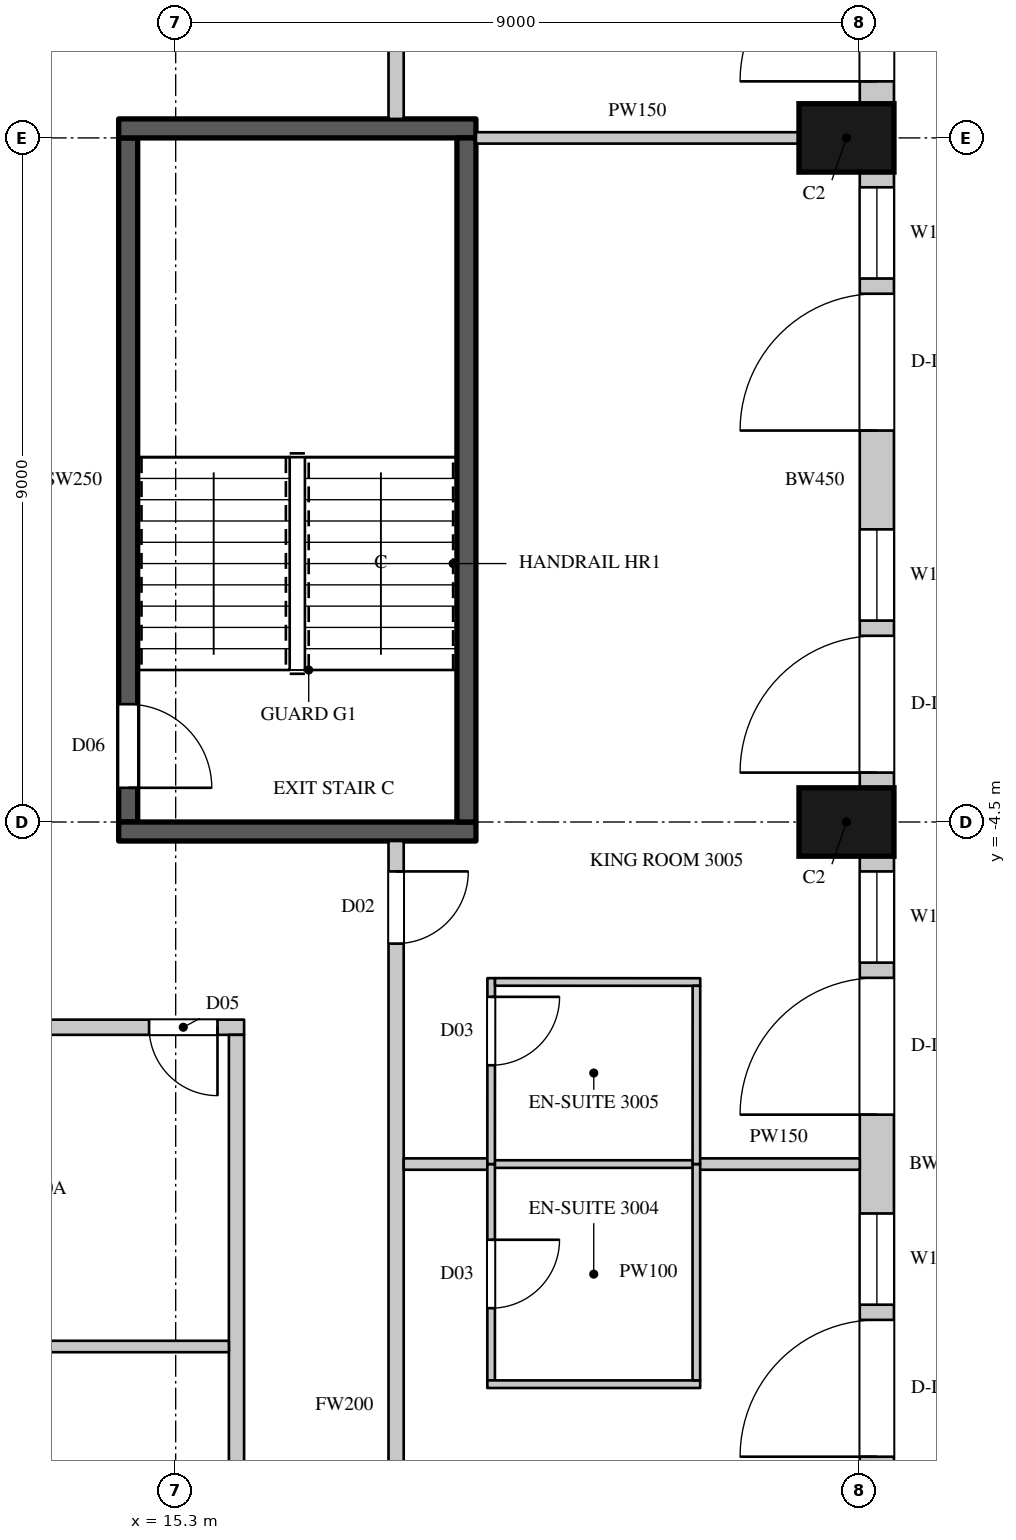
"""IFC4 building model, lengths in metres.
Left out: names, types, materials, properties, quantities, classifications, styles, units other than length and angle.
Written with IfcOpenShell. Run it as: python <this file> out.ifc"""

import sys

from ifc_helpers import new_model, si_unit, direction, frame, frame_2d, origin, origin_2d, place, context, subcontext, project, spatial, rectangle, extrude, element, fill, save


model = new_model("IFC4")
c1 = context("Model", 3, precision=1e-05, world=origin(), true_north=direction((0.0, 1.0)))
c2 = subcontext(c1, "Body", "Model", "MODEL_VIEW")
j1 = project(units=[si_unit("LENGTHUNIT", "METRE"), si_unit("PLANEANGLEUNIT", "RADIAN")], contexts=[c1])
p1 = place(None, origin())
s1 = spatial("IfcSite", under=j1, at=p1, CompositionType="ELEMENT")
p2 = place(p1, origin())
s2 = spatial("IfcBuilding", under=s1, at=p2, CompositionType="ELEMENT")
p3 = place(p2, frame((0.0, 0.0, 138.3)))
s3 = spatial("IfcBuildingStorey", under=s2, at=p3, CompositionType="ELEMENT", Elevation=138.3)
for number, where, z_axis, x_axis in (
    (1, (24.125, -4.5, 0.0), (0.0, 0.0, 1.0), (0.0, 1.0, 0.0)),
    (2, (24.125, 4.5, 0.0), (0.0, 0.0, 1.0), (0.0, 1.0, 0.0)),
):
    element("IfcColumn", number, at=place(p3, frame(where, z_axis=z_axis, x_axis=x_axis)), inside=s3, PredefinedType="COLUMN", context=c2, shape_type="SweptSolid", body=[
        extrude(rectangle(XDim=0.9, YDim=1.25, at=origin_2d()), origin(), (0.0, 0.0, 1.0), 3.6),
    ])
p4 = place(p3, frame((24.525, -13.05, 0.0), z_axis=(0.0, 0.0, 1.0), x_axis=(0.0, 1.0, 0.0)))
e3 = element("IfcWall", 3, at=p4, inside=s3, PredefinedType="SOLIDWALL", context=c2, shape_type="SweptSolid", body=[
    extrude(rectangle(XDim=8.1, YDim=0.45, at=frame_2d((4.05, 0.0))), origin(), (0.0, 0.0, 1.0), 3.3),
])
p5 = place(p4, frame((0.2, 0.0, 0.0)))
e4 = element("IfcOpeningElement", 4, at=p5, cuts=e3, PredefinedType="OPENING", context=c2, shape_type="SweptSolid", body=[
    extrude(rectangle(XDim=1.8, YDim=2.4, at=frame_2d((0.9, 1.2))), frame((0.0, 0.235, 0.0), z_axis=(0.0, -1.0, 0.0), x_axis=(1.0, 0.0, 0.0)), (0.0, 0.0, 1.0), 0.47),
])
p6 = place(p4, frame((2.2, 0.0, 1.05)))
e5 = element("IfcOpeningElement", 5, at=p6, cuts=e3, PredefinedType="OPENING", context=c2, shape_type="SweptSolid", body=[
    extrude(rectangle(XDim=1.2, YDim=2.0, at=frame_2d((0.6, 1.0))), frame((0.0, 0.235, 0.0), z_axis=(0.0, -1.0, 0.0), x_axis=(1.0, 0.0, 0.0)), (0.0, 0.0, 1.0), 0.47),
])
p7 = place(p4, frame((4.7, 0.0, 0.0)))
e6 = element("IfcOpeningElement", 6, at=p7, cuts=e3, PredefinedType="OPENING", context=c2, shape_type="SweptSolid", body=[
    extrude(rectangle(XDim=1.8, YDim=2.4, at=frame_2d((0.9, 1.2))), frame((0.0, 0.235, 0.0), z_axis=(0.0, -1.0, 0.0), x_axis=(1.0, 0.0, 0.0)), (0.0, 0.0, 1.0), 0.47),
])
p8 = place(p4, frame((6.7, 0.0, 1.05)))
e7 = element("IfcOpeningElement", 7, at=p8, cuts=e3, PredefinedType="OPENING", context=c2, shape_type="SweptSolid", body=[
    extrude(rectangle(XDim=1.2, YDim=2.0, at=frame_2d((0.6, 1.0))), frame((0.0, 0.235, 0.0), z_axis=(0.0, -1.0, 0.0), x_axis=(1.0, 0.0, 0.0)), (0.0, 0.0, 1.0), 0.47),
])
p9 = place(p3, frame((24.525, -4.05, 0.0), z_axis=(0.0, 0.0, 1.0), x_axis=(0.0, 1.0, 0.0)))
e8 = element("IfcWall", 8, at=p9, inside=s3, PredefinedType="SOLIDWALL", context=c2, shape_type="SweptSolid", body=[
    extrude(rectangle(XDim=8.1, YDim=0.45, at=frame_2d((4.05, 0.0))), origin(), (0.0, 0.0, 1.0), 3.3),
])
p10 = place(p9, frame((0.2, 0.0, 0.0)))
e9 = element("IfcOpeningElement", 9, at=p10, cuts=e8, PredefinedType="OPENING", context=c2, shape_type="SweptSolid", body=[
    extrude(rectangle(XDim=1.8, YDim=2.4, at=frame_2d((0.9, 1.2))), frame((0.0, 0.235, 0.0), z_axis=(0.0, -1.0, 0.0), x_axis=(1.0, 0.0, 0.0)), (0.0, 0.0, 1.0), 0.47),
])
p11 = place(p9, frame((2.2, 0.0, 1.05)))
e10 = element("IfcOpeningElement", 10, at=p11, cuts=e8, PredefinedType="OPENING", context=c2, shape_type="SweptSolid", body=[
    extrude(rectangle(XDim=1.2, YDim=2.0, at=frame_2d((0.6, 1.0))), frame((0.0, 0.235, 0.0), z_axis=(0.0, -1.0, 0.0), x_axis=(1.0, 0.0, 0.0)), (0.0, 0.0, 1.0), 0.47),
])
p12 = place(p9, frame((4.7, 0.0, 0.0)))
e11 = element("IfcOpeningElement", 11, at=p12, cuts=e8, PredefinedType="OPENING", context=c2, shape_type="SweptSolid", body=[
    extrude(rectangle(XDim=1.8, YDim=2.4, at=frame_2d((0.9, 1.2))), frame((0.0, 0.235, 0.0), z_axis=(0.0, -1.0, 0.0), x_axis=(1.0, 0.0, 0.0)), (0.0, 0.0, 1.0), 0.47),
])
p13 = place(p9, frame((6.7, 0.0, 1.05)))
e12 = element("IfcOpeningElement", 12, at=p13, cuts=e8, PredefinedType="OPENING", context=c2, shape_type="SweptSolid", body=[
    extrude(rectangle(XDim=1.2, YDim=2.0, at=frame_2d((0.6, 1.0))), frame((0.0, 0.235, 0.0), z_axis=(0.0, -1.0, 0.0), x_axis=(1.0, 0.0, 0.0)), (0.0, 0.0, 1.0), 0.47),
])
p14 = place(p3, frame((24.525, 4.95, 0.0), z_axis=(0.0, 0.0, 1.0), x_axis=(0.0, 1.0, 0.0)))
e13 = element("IfcWall", 13, at=p14, inside=s3, PredefinedType="SOLIDWALL", context=c2, shape_type="SweptSolid", body=[
    extrude(rectangle(XDim=8.439, YDim=0.45, at=frame_2d((4.219, 0.0))), origin(), (0.0, 0.0, 1.0), 3.3),
])
p15 = place(p14, frame((0.294, 0.0, 0.0)))
e14 = element("IfcOpeningElement", 14, at=p15, cuts=e13, PredefinedType="OPENING", context=c2, shape_type="SweptSolid", body=[
    extrude(rectangle(XDim=1.8, YDim=2.4, at=frame_2d((0.9, 1.2))), frame((0.0, 0.235, 0.0), z_axis=(0.0, -1.0, 0.0), x_axis=(1.0, 0.0, 0.0)), (0.0, 0.0, 1.0), 0.47),
])
p16 = place(p14, frame((2.294, 0.0, 1.05)))
e15 = element("IfcOpeningElement", 15, at=p16, cuts=e13, PredefinedType="OPENING", context=c2, shape_type="SweptSolid", body=[
    extrude(rectangle(XDim=1.2, YDim=2.0, at=frame_2d((0.6, 1.0))), frame((0.0, 0.235, 0.0), z_axis=(0.0, -1.0, 0.0), x_axis=(1.0, 0.0, 0.0)), (0.0, 0.0, 1.0), 0.47),
])
p17 = place(p14, frame((5.232, 0.0, 1.05)))
e16 = element("IfcOpeningElement", 16, at=p17, cuts=e13, PredefinedType="OPENING", context=c2, shape_type="SweptSolid", body=[
    extrude(rectangle(XDim=2.7, YDim=2.0, at=frame_2d((1.35, 1.0))), frame((0.0, 0.235, 0.0), z_axis=(0.0, -1.0, 0.0), x_axis=(1.0, 0.0, 0.0)), (0.0, 0.0, 1.0), 0.47),
])
p18 = place(p3, frame((10.5, -7.2, 0.0), z_axis=(0.0, 0.0, 1.0), x_axis=(1.0, 0.0, 0.0)))
e17 = element("IfcWall", 17, at=p18, inside=s3, PredefinedType="PARTITIONING", context=c2, shape_type="SweptSolid", body=[
    extrude(rectangle(XDim=5.7, YDim=0.2, at=frame_2d((2.85, 0.0))), origin(), (0.0, 0.0, 1.0), 3.3),
])
p19 = place(p18, frame((4.45, 0.0, 0.0)))
e18 = element("IfcOpeningElement", 18, at=p19, cuts=e17, PredefinedType="OPENING", context=c2, shape_type="SweptSolid", body=[
    extrude(rectangle(XDim=0.9, YDim=2.2, at=frame_2d((0.45, 1.1))), frame((0.0, 0.11, 0.0), z_axis=(0.0, -1.0, 0.0), x_axis=(1.0, 0.0, 0.0)), (0.0, 0.0, 1.0), 0.22),
])
p20 = place(p3, frame((16.1, -17.4, 0.0), z_axis=(0.0, 0.0, 1.0), x_axis=(0.0, 1.0, 0.0)))
e19 = element("IfcWall", 19, at=p20, inside=s3, PredefinedType="PARTITIONING", context=c2, shape_type="SweptSolid", body=[
    extrude(rectangle(XDim=10.1, YDim=0.2, at=frame_2d((5.05, 0.0))), origin(), (0.0, 0.0, 1.0), 3.3),
])
p21 = place(p3, frame((18.2, -19.6, 0.0), z_axis=(0.0, 0.0, 1.0), x_axis=(0.0, 1.0, 0.0)))
e20 = element("IfcWall", 20, at=p21, inside=s3, PredefinedType="PARTITIONING", context=c2, shape_type="SweptSolid", body=[
    extrude(rectangle(XDim=14.85, YDim=0.2, at=frame_2d((7.425, 0.0))), origin(), (0.0, 0.0, 1.0), 3.3),
])
p22 = place(p21, frame((3.9, 0.0, 0.0)))
e21 = element("IfcOpeningElement", 21, at=p22, cuts=e20, PredefinedType="OPENING", context=c2, shape_type="SweptSolid", body=[
    extrude(rectangle(XDim=0.95, YDim=2.2, at=frame_2d((0.475, 1.1))), frame((0.0, 0.11, 0.0), z_axis=(0.0, -1.0, 0.0), x_axis=(1.0, 0.0, 0.0)), (0.0, 0.0, 1.0), 0.22),
])
p23 = place(p21, frame((13.5, 0.0, 0.0)))
e22 = element("IfcOpeningElement", 22, at=p23, cuts=e20, PredefinedType="OPENING", context=c2, shape_type="SweptSolid", body=[
    extrude(rectangle(XDim=0.95, YDim=2.2, at=frame_2d((0.475, 1.1))), frame((0.0, 0.11, 0.0), z_axis=(0.0, -1.0, 0.0), x_axis=(1.0, 0.0, 0.0)), (0.0, 0.0, 1.0), 0.22),
])
p24 = place(p3, frame((18.2, 4.75, 0.0), z_axis=(0.0, 0.0, 1.0), x_axis=(0.0, 1.0, 0.0)))
e23 = element("IfcWall", 23, at=p24, inside=s3, PredefinedType="PARTITIONING", context=c2, shape_type="SweptSolid", body=[
    extrude(rectangle(XDim=14.164, YDim=0.2, at=frame_2d((7.082, 0.0))), origin(), (0.0, 0.0, 1.0), 3.3),
])
p25 = place(p24, frame((1.7, 0.0, 0.0)))
e24 = element("IfcOpeningElement", 24, at=p25, cuts=e23, PredefinedType="OPENING", context=c2, shape_type="SweptSolid", body=[
    extrude(rectangle(XDim=0.9, YDim=2.2, at=frame_2d((0.45, 1.1))), frame((0.0, 0.11, 0.0), z_axis=(0.0, -1.0, 0.0), x_axis=(1.0, 0.0, 0.0)), (0.0, 0.0, 1.0), 0.22),
])
p26 = place(p3, frame((10.4, -11.4, 0.0), z_axis=(0.0, 0.0, 1.0), x_axis=(1.0, 0.0, 0.0)))
e25 = element("IfcWall", 25, at=p26, inside=s3, PredefinedType="PARTITIONING", context=c2, shape_type="SweptSolid", body=[
    extrude(rectangle(XDim=5.6, YDim=0.15, at=frame_2d((2.8, 0.0))), origin(), (0.0, 0.0, 1.0), 3.3),
])
p27 = place(p3, frame((18.3, -9.0, 0.0), z_axis=(0.0, 0.0, 1.0), x_axis=(1.0, 0.0, 0.0)))
e26 = element("IfcWall", 26, at=p27, inside=s3, PredefinedType="PARTITIONING", context=c2, shape_type="SweptSolid", body=[
    extrude(rectangle(XDim=1.13, YDim=0.15, at=frame_2d((0.565, 0.0))), origin(), (0.0, 0.0, 1.0), 2.65),
])
p28 = place(p3, frame((19.25, 4.5, 0.0), z_axis=(0.0, 0.0, 1.0), x_axis=(1.0, 0.0, 0.0)))
e27 = element("IfcWall", 27, at=p28, inside=s3, PredefinedType="PARTITIONING", context=c2, shape_type="SweptSolid", body=[
    extrude(rectangle(XDim=4.25, YDim=0.15, at=frame_2d((2.125, 0.0))), origin(), (0.0, 0.0, 1.0), 3.3),
])
p29 = place(p3, frame((22.17, -9.0, 0.0), z_axis=(0.0, 0.0, 1.0), x_axis=(1.0, 0.0, 0.0)))
e28 = element("IfcWall", 28, at=p29, inside=s3, PredefinedType="PARTITIONING", context=c2, shape_type="SweptSolid", body=[
    extrude(rectangle(XDim=2.13, YDim=0.15, at=frame_2d((1.065, 0.0))), origin(), (0.0, 0.0, 1.0), 2.65),
])
p30 = place(p3, frame((14.675, -4.5, 0.0), z_axis=(0.0, 0.0, 1.0), x_axis=(0.0, 1.0, 0.0)))
e29 = element("IfcWall", 29, at=p30, inside=s3, PredefinedType="SHEAR", context=c2, shape_type="SweptSolid", body=[
    extrude(rectangle(XDim=9.0, YDim=0.25, at=frame_2d((4.5, 0.0))), origin(), (0.0, 0.0, 1.0), 3.3),
])
p31 = place(p30, frame((0.45, 0.0, 0.0)))
e30 = element("IfcOpeningElement", 30, at=p31, cuts=e29, PredefinedType="OPENING", context=c2, shape_type="SweptSolid", body=[
    extrude(rectangle(XDim=1.1, YDim=2.2, at=frame_2d((0.55, 1.1))), frame((0.0, 0.135, 0.0), z_axis=(0.0, -1.0, 0.0), x_axis=(1.0, 0.0, 0.0)), (0.0, 0.0, 1.0), 0.27),
])
for number, where, z_axis, x_axis in (
    (31, (14.55, -4.625, 0.0), (0.0, 0.0, 1.0), (1.0, 0.0, 0.0)),
    (32, (14.55, 4.625, 0.0), (0.0, 0.0, 1.0), (1.0, 0.0, 0.0)),
):
    element("IfcWall", number, at=place(p3, frame(where, z_axis=z_axis, x_axis=x_axis)), inside=s3, PredefinedType="SHEAR", context=c2, shape_type="SweptSolid", body=[
        extrude(rectangle(XDim=4.7, YDim=0.25, at=frame_2d((2.35, 0.0))), origin(), (0.0, 0.0, 1.0), 3.3),
    ])
p32 = place(p3, frame((19.125, -4.5, 0.0), z_axis=(0.0, 0.0, 1.0), x_axis=(0.0, 1.0, 0.0)))
e33 = element("IfcWall", 33, at=p32, inside=s3, PredefinedType="SHEAR", context=c2, shape_type="SweptSolid", body=[
    extrude(rectangle(XDim=9.0, YDim=0.25, at=frame_2d((4.5, 0.0))), origin(), (0.0, 0.0, 1.0), 3.3),
])
p33 = place(p3, frame((19.43, -9.0, 0.0), z_axis=(0.0, 0.0, 1.0), x_axis=(1.0, 0.0, 0.0)))
e34 = element("IfcWall", 34, at=p33, inside=s3, PredefinedType="PARTITIONING", context=c2, shape_type="SweptSolid", body=[
    extrude(rectangle(XDim=2.74, YDim=0.1, at=frame_2d((1.37, 0.0))), origin(), (0.0, 0.0, 1.0), 2.65),
])
p34 = place(p3, frame((19.45, -11.846, 0.0), z_axis=(0.0, 0.0, 1.0), x_axis=(0.0, 1.0, 0.0)))
e35 = element("IfcWall", 35, at=p34, inside=s3, PredefinedType="PARTITIONING", context=c2, shape_type="SweptSolid", body=[
    extrude(rectangle(XDim=2.846, YDim=0.1, at=frame_2d((1.423, 0.0))), origin(), (0.0, 0.0, 1.0), 3.3),
])
p35 = place(p34, frame((0.95, 0.0, 0.0)))
e36 = element("IfcOpeningElement", 36, at=p35, cuts=e35, PredefinedType="OPENING", context=c2, shape_type="SweptSolid", body=[
    extrude(rectangle(XDim=0.9, YDim=2.2, at=frame_2d((0.45, 1.1))), frame((0.0, 0.06, 0.0), z_axis=(0.0, -1.0, 0.0), x_axis=(1.0, 0.0, 0.0)), (0.0, 0.0, 1.0), 0.12),
])
p36 = place(p3, frame((19.4, -11.896, 0.0), z_axis=(0.0, 0.0, 1.0), x_axis=(1.0, 0.0, 0.0)))
e37 = element("IfcWall", 37, at=p36, inside=s3, PredefinedType="PARTITIONING", context=c2, shape_type="SweptSolid", body=[
    extrude(rectangle(XDim=2.8, YDim=0.1, at=frame_2d((1.4, 0.0))), origin(), (0.0, 0.0, 1.0), 3.3),
])
p37 = place(p3, frame((19.45, -9.0, 0.0), z_axis=(0.0, 0.0, 1.0), x_axis=(0.000399241409, 0.999999920303, 0.0)))
e38 = element("IfcWall", 38, at=p37, inside=s3, PredefinedType="PARTITIONING", context=c2, shape_type="SweptSolid", body=[
    extrude(rectangle(XDim=2.446, YDim=0.1, at=frame_2d((1.223, 0.0))), origin(), (0.0, 0.0, 1.0), 3.3),
])
p38 = place(p37, frame((1.3, 0.0, 0.0)))
e39 = element("IfcOpeningElement", 39, at=p38, cuts=e38, PredefinedType="OPENING", context=c2, shape_type="SweptSolid", body=[
    extrude(rectangle(XDim=0.9, YDim=2.2, at=frame_2d((0.45, 1.1))), frame((0.0, 0.06, 0.0), z_axis=(0.0, -1.0, 0.0), x_axis=(1.0, 0.0, 0.0)), (0.0, 0.0, 1.0), 0.12),
])
p39 = place(p3, frame((19.501, -6.604, 0.0), z_axis=(0.0, 0.0, 1.0), x_axis=(0.999999934588, -0.000361696332, 0.0)))
e40 = element("IfcWall", 40, at=p39, inside=s3, PredefinedType="PARTITIONING", context=c2, shape_type="SweptSolid", body=[
    extrude(rectangle(XDim=2.7, YDim=0.1, at=frame_2d((1.35, 0.0))), origin(), (0.0, 0.0, 1.0), 3.3),
])
p40 = place(p3, frame((22.15, -11.846, 0.0), z_axis=(0.0, 0.0, 1.0), x_axis=(0.0, 1.0, 0.0)))
e41 = element("IfcWall", 41, at=p40, inside=s3, PredefinedType="PARTITIONING", context=c2, shape_type="SweptSolid", body=[
    extrude(rectangle(XDim=2.846, YDim=0.1, at=frame_2d((1.423, 0.0))), origin(), (0.0, 0.0, 1.0), 3.3),
])
p41 = place(p3, frame((22.15, -9.0, 0.0), z_axis=(0.0, 0.0, 1.0), x_axis=(0.00041644973, 0.999999913285, 0.0)))
e42 = element("IfcWall", 42, at=p41, inside=s3, PredefinedType="PARTITIONING", context=c2, shape_type="SweptSolid", body=[
    extrude(rectangle(XDim=2.345, YDim=0.1, at=frame_2d((1.172, 0.0))), origin(), (0.0, 0.0, 1.0), 3.3),
])
p42 = place(p5, origin())
e43 = element("IfcDoor", 43, at=p42, inside=s3, OperationType="SLIDING_TO_LEFT", PredefinedType="DOOR", context=c2, shape_type="SweptSolid", body=[
    extrude(rectangle(XDim=1.8, YDim=2.4, at=frame_2d((0.9, 1.2))), frame((0.0, 0.13, 0.0), z_axis=(0.0, -1.0, 0.0), x_axis=(1.0, 0.0, 0.0)), (0.0, 0.0, 1.0), 0.05),
])
fill(e4, e43)
p43 = place(p6, origin())
e44 = element("IfcWindow", 44, at=p43, inside=s3, PartitioningType="SINGLE_PANEL", PredefinedType="WINDOW", context=c2, shape_type="SweptSolid", body=[
    extrude(rectangle(XDim=1.2, YDim=2.0, at=frame_2d((0.6, 1.0))), frame((0.0, 0.135, 0.0), z_axis=(0.0, -1.0, 0.0), x_axis=(1.0, 0.0, 0.0)), (0.0, 0.0, 1.0), 0.06),
])
fill(e5, e44)
p44 = place(p7, origin())
e45 = element("IfcDoor", 45, at=p44, inside=s3, OperationType="SLIDING_TO_LEFT", PredefinedType="DOOR", context=c2, shape_type="SweptSolid", body=[
    extrude(rectangle(XDim=1.8, YDim=2.4, at=frame_2d((0.9, 1.2))), frame((0.0, 0.13, 0.0), z_axis=(0.0, -1.0, 0.0), x_axis=(1.0, 0.0, 0.0)), (0.0, 0.0, 1.0), 0.05),
])
fill(e6, e45)
p45 = place(p8, origin())
e46 = element("IfcWindow", 46, at=p45, inside=s3, PartitioningType="SINGLE_PANEL", PredefinedType="WINDOW", context=c2, shape_type="SweptSolid", body=[
    extrude(rectangle(XDim=1.2, YDim=2.0, at=frame_2d((0.6, 1.0))), frame((0.0, 0.135, 0.0), z_axis=(0.0, -1.0, 0.0), x_axis=(1.0, 0.0, 0.0)), (0.0, 0.0, 1.0), 0.06),
])
fill(e7, e46)
p46 = place(p10, origin())
e47 = element("IfcDoor", 47, at=p46, inside=s3, OperationType="SLIDING_TO_LEFT", PredefinedType="DOOR", context=c2, shape_type="SweptSolid", body=[
    extrude(rectangle(XDim=1.8, YDim=2.4, at=frame_2d((0.9, 1.2))), frame((0.0, 0.13, 0.0), z_axis=(0.0, -1.0, 0.0), x_axis=(1.0, 0.0, 0.0)), (0.0, 0.0, 1.0), 0.05),
])
fill(e9, e47)
p47 = place(p11, origin())
e48 = element("IfcWindow", 48, at=p47, inside=s3, PartitioningType="SINGLE_PANEL", PredefinedType="WINDOW", context=c2, shape_type="SweptSolid", body=[
    extrude(rectangle(XDim=1.2, YDim=2.0, at=frame_2d((0.6, 1.0))), frame((0.0, 0.135, 0.0), z_axis=(0.0, -1.0, 0.0), x_axis=(1.0, 0.0, 0.0)), (0.0, 0.0, 1.0), 0.06),
])
fill(e10, e48)
p48 = place(p12, origin())
e49 = element("IfcDoor", 49, at=p48, inside=s3, OperationType="SLIDING_TO_LEFT", PredefinedType="DOOR", context=c2, shape_type="SweptSolid", body=[
    extrude(rectangle(XDim=1.8, YDim=2.4, at=frame_2d((0.9, 1.2))), frame((0.0, 0.13, 0.0), z_axis=(0.0, -1.0, 0.0), x_axis=(1.0, 0.0, 0.0)), (0.0, 0.0, 1.0), 0.05),
])
fill(e11, e49)
p49 = place(p13, origin())
e50 = element("IfcWindow", 50, at=p49, inside=s3, PartitioningType="SINGLE_PANEL", PredefinedType="WINDOW", context=c2, shape_type="SweptSolid", body=[
    extrude(rectangle(XDim=1.2, YDim=2.0, at=frame_2d((0.6, 1.0))), frame((0.0, 0.135, 0.0), z_axis=(0.0, -1.0, 0.0), x_axis=(1.0, 0.0, 0.0)), (0.0, 0.0, 1.0), 0.06),
])
fill(e12, e50)
p50 = place(p15, origin())
e51 = element("IfcDoor", 51, at=p50, inside=s3, OperationType="SLIDING_TO_LEFT", PredefinedType="DOOR", context=c2, shape_type="SweptSolid", body=[
    extrude(rectangle(XDim=1.8, YDim=2.4, at=frame_2d((0.9, 1.2))), frame((0.0, 0.13, 0.0), z_axis=(0.0, -1.0, 0.0), x_axis=(1.0, 0.0, 0.0)), (0.0, 0.0, 1.0), 0.05),
])
fill(e14, e51)
p51 = place(p19, origin())
e52 = element("IfcDoor", 52, at=p51, inside=s3, OperationType="SINGLE_SWING_LEFT", PredefinedType="DOOR", context=c2, shape_type="SweptSolid", body=[
    extrude(rectangle(XDim=0.9, YDim=2.2, at=frame_2d((0.45, 1.1))), frame((0.0, 0.025, 0.0), z_axis=(0.0, -1.0, 0.0), x_axis=(1.0, 0.0, 0.0)), (0.0, 0.0, 1.0), 0.05),
])
fill(e18, e52)
p52 = place(p35, origin())
e53 = element("IfcDoor", 53, at=p52, inside=s3, OperationType="SINGLE_SWING_LEFT", PredefinedType="DOOR", context=c2, shape_type="SweptSolid", body=[
    extrude(rectangle(XDim=0.9, YDim=2.2, at=frame_2d((0.45, 1.1))), frame((0.0, 0.025, 0.0), z_axis=(0.0, -1.0, 0.0), x_axis=(1.0, 0.0, 0.0)), (0.0, 0.0, 1.0), 0.05),
])
fill(e36, e53)
p53 = place(p23, origin())
e54 = element("IfcDoor", 54, at=p53, inside=s3, OperationType="SINGLE_SWING_LEFT", PredefinedType="DOOR", context=c2, shape_type="SweptSolid", body=[
    extrude(rectangle(XDim=0.95, YDim=2.2, at=frame_2d((0.475, 1.1))), frame((0.0, 0.025, 0.0), z_axis=(0.0, -1.0, 0.0), x_axis=(1.0, 0.0, 0.0)), (0.0, 0.0, 1.0), 0.05),
])
fill(e22, e54)
p54 = place(p38, origin())
e55 = element("IfcDoor", 55, at=p54, inside=s3, OperationType="SINGLE_SWING_LEFT", PredefinedType="DOOR", context=c2, shape_type="SweptSolid", body=[
    extrude(rectangle(XDim=0.9, YDim=2.2, at=frame_2d((0.45, 1.1))), frame((0.0, 0.025, 0.0), z_axis=(0.0, -1.0, 0.0), x_axis=(1.0, 0.0, 0.0)), (0.0, 0.0, 1.0), 0.05),
])
fill(e39, e55)
p55 = place(p31, origin())
e56 = element("IfcDoor", 56, at=p55, inside=s3, OperationType="SINGLE_SWING_RIGHT", PredefinedType="DOOR", context=c2, shape_type="SweptSolid", body=[
    extrude(rectangle(XDim=1.1, YDim=2.2, at=frame_2d((0.55, 1.1))), frame((0.0, 0.025, 0.0), z_axis=(0.0, -1.0, 0.0), x_axis=(1.0, 0.0, 0.0)), (0.0, 0.0, 1.0), 0.05),
])
fill(e30, e56)
save(model, sys.argv[1])
